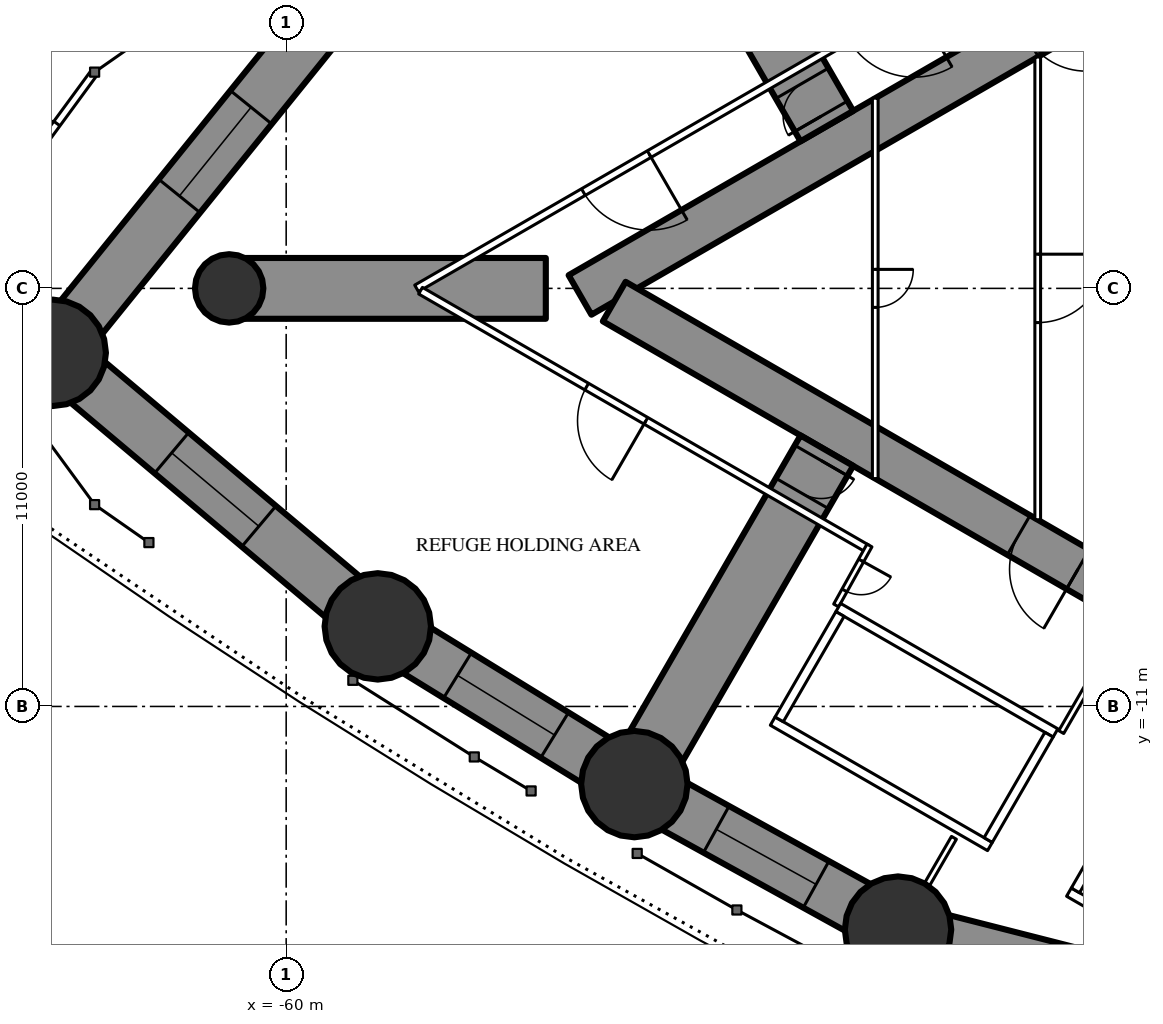
"""IFC4 building model, lengths in metres.
Left out: names, types, materials, properties, quantities, classifications, styles, units other than length and angle.
Written with IfcOpenShell. Run it as: python <this file> out.ifc"""

import sys

from ifc_helpers import new_model, si_unit, direction, frame, frame_2d, origin, origin_2d, place, context, subcontext, project, spatial, rectangle, circle, extrude, element, fill, save


model = new_model("IFC4")
c1 = context("Model", 3, precision=1e-05, world=origin(), true_north=direction((0.0, 1.0)))
c2 = subcontext(c1, "Body", "Model", "MODEL_VIEW")
j1 = project(units=[si_unit("LENGTHUNIT", "METRE"), si_unit("PLANEANGLEUNIT", "RADIAN")], contexts=[c1])
p1 = place(None, origin())
s1 = spatial("IfcSite", under=j1, at=p1, CompositionType="ELEMENT")
p2 = place(p1, origin())
s2 = spatial("IfcBuilding", under=s1, at=p2, CompositionType="ELEMENT")
p3 = place(p2, frame((0.0, 0.0, 152.7)))
s3 = spatial("IfcBuildingStorey", under=s2, at=p3, CompositionType="ELEMENT", Elevation=152.7)
for number, where, z_axis, x_axis in (
    (1, (-66.143, -1.695, 0.0), (0.0, 0.0, 1.0), (1.0, 0.0, 0.0)),
    (2, (-57.59, -8.893, 0.0), (0.0, 0.0, 1.0), (1.0, 0.0, 0.0)),
    (3, (-50.839, -13.043, 0.0), (0.0, 0.0, 1.0), (1.0, 0.0, 0.0)),
    (4, (-43.9, -16.871, 0.0), (0.0, 0.0, 1.0), (1.0, 0.0, 0.0)),
):
    element("IfcColumn", number, at=place(p3, frame(where, z_axis=z_axis, x_axis=x_axis)), inside=s3, PredefinedType="COLUMN", context=c2, shape_type="SweptSolid", body=[
        extrude(circle(Radius=1.4, at=origin_2d()), origin(), (0.0, 0.0, 1.0), 3.6),
    ])
p4 = place(p3, frame((-61.5, 0.0, 0.0), z_axis=(0.0, 0.0, 1.0), x_axis=(1.0, 0.0, 0.0)))
e5 = element("IfcColumn", 5, at=p4, inside=s3, PredefinedType="COLUMN", context=c2, shape_type="SweptSolid", body=[
    extrude(circle(Radius=0.9, at=origin_2d()), origin(), (0.0, 0.0, 1.0), 3.6),
])
p5 = place(p3, frame((-27.2, 14.3, 0.0), z_axis=(0.0, 0.0, 1.0), x_axis=(-0.866026593062, -0.499997940104, 0.0)))
e6 = element("IfcWall", 6, at=p5, inside=s3, PredefinedType="SHEAR", context=c2, shape_type="SweptSolid", body=[
    extrude(rectangle(XDim=28.946, YDim=1.2, at=frame_2d((14.473, 0.0))), origin(), (0.0, 0.0, 1.0), 3.6),
])
p6 = place(p5, frame((4.6, 0.0, 0.0)))
e7 = element("IfcOpeningElement", 7, at=p6, cuts=e6, PredefinedType="OPENING", context=c2, shape_type="SweptSolid", body=[
    extrude(rectangle(XDim=1.0, YDim=2.2, at=frame_2d((0.5, 1.1))), frame((0.0, 0.61, 0.0), z_axis=(0.0, -1.0, 0.0), x_axis=(1.0, 0.0, 0.0)), (0.0, 0.0, 1.0), 1.22),
])
p7 = place(p5, frame((13.568, 0.0, 0.0)))
e8 = element("IfcOpeningElement", 8, at=p7, cuts=e6, PredefinedType="OPENING", context=c2, shape_type="SweptSolid", body=[
    extrude(rectangle(XDim=1.8, YDim=2.04, at=frame_2d((0.9, 1.02))), frame((0.0, 0.61, 0.0), z_axis=(0.0, -1.0, 0.0), x_axis=(1.0, 0.0, 0.0)), (0.0, 0.0, 1.0), 1.22),
])
p8 = place(p3, frame((-27.2, -14.3, 0.0), z_axis=(0.0, 0.0, 1.0), x_axis=(-0.866024021859, 0.500002393557, 0.0)))
e9 = element("IfcWall", 9, at=p8, inside=s3, PredefinedType="SHEAR", context=c2, shape_type="SweptSolid", body=[
    extrude(rectangle(XDim=27.907, YDim=1.2, at=frame_2d((13.954, 0.0))), origin(), (0.0, 0.0, 1.0), 3.6),
])
p9 = place(p8, frame((4.6, 0.0, 0.0)))
e10 = element("IfcOpeningElement", 10, at=p9, cuts=e9, PredefinedType="OPENING", context=c2, shape_type="SweptSolid", body=[
    extrude(rectangle(XDim=1.0, YDim=2.2, at=frame_2d((0.5, 1.1))), frame((0.0, 0.61, 0.0), z_axis=(0.0, -1.0, 0.0), x_axis=(1.0, 0.0, 0.0)), (0.0, 0.0, 1.0), 1.22),
])
p10 = place(p8, frame((13.818, 0.0, 0.0)))
e11 = element("IfcOpeningElement", 11, at=p10, cuts=e9, PredefinedType="OPENING", context=c2, shape_type="SweptSolid", body=[
    extrude(rectangle(XDim=1.8, YDim=2.2, at=frame_2d((0.9, 1.1))), frame((0.0, 0.61, 0.0), z_axis=(0.0, -1.0, 0.0), x_axis=(1.0, 0.0, 0.0)), (0.0, 0.0, 1.0), 1.22),
])
p11 = place(p3, frame((-45.773, 4.27, 0.0), z_axis=(0.0, 0.0, 1.0), x_axis=(-0.499995723283, 0.866027872934, 0.0)))
e12 = element("IfcWall", 12, at=p11, inside=s3, PredefinedType="SHEAR", context=c2, shape_type="SweptSolid", body=[
    extrude(rectangle(XDim=10.131, YDim=1.6, at=frame_2d((5.065, 0.0))), origin(), (0.0, 0.0, 1.0), 3.6),
])
p12 = place(p11, frame((0.3, 0.0, 0.0)))
e13 = element("IfcOpeningElement", 13, at=p12, cuts=e12, PredefinedType="OPENING", context=c2, shape_type="SweptSolid", body=[
    extrude(rectangle(XDim=1.0, YDim=2.2, at=frame_2d((0.5, 1.1))), frame((0.0, 0.81, 0.0), z_axis=(0.0, -1.0, 0.0), x_axis=(1.0, 0.0, 0.0)), (0.0, 0.0, 1.0), 1.62),
])
p13 = place(p3, frame((-53.168, 0.0, 0.0), z_axis=(0.0, 0.0, 1.0), x_axis=(-1.0, 0.0, 0.0)))
e14 = element("IfcWall", 14, at=p13, inside=s3, PredefinedType="SHEAR", context=c2, shape_type="SweptSolid", body=[
    extrude(rectangle(XDim=8.332, YDim=1.6, at=frame_2d((4.166, 0.0))), origin(), (0.0, 0.0, 1.0), 3.6),
])
p14 = place(p3, frame((-45.773, -4.27, 0.0), z_axis=(0.0, 0.0, 1.0), x_axis=(-0.499995723283, -0.866027872934, 0.0)))
e15 = element("IfcWall", 15, at=p14, inside=s3, PredefinedType="SHEAR", context=c2, shape_type="SweptSolid", body=[
    extrude(rectangle(XDim=10.131, YDim=1.6, at=frame_2d((5.065, 0.0))), origin(), (0.0, 0.0, 1.0), 3.6),
])
p15 = place(p14, frame((0.3, 0.0, 0.0)))
e16 = element("IfcOpeningElement", 16, at=p15, cuts=e15, PredefinedType="OPENING", context=c2, shape_type="SweptSolid", body=[
    extrude(rectangle(XDim=1.0, YDim=2.2, at=frame_2d((0.5, 1.1))), frame((0.0, 0.81, 0.0), z_axis=(0.0, -1.0, 0.0), x_axis=(1.0, 0.0, 0.0)), (0.0, 0.0, 1.0), 1.62),
])
p16 = place(p3, frame((-57.59, 8.893, 0.0), z_axis=(0.0, 0.0, 1.0), x_axis=(-0.628373846765, -0.777911504416, 0.0)))
e17 = element("IfcWall", 17, at=p16, inside=s3, PredefinedType="SHEAR", context=c2, shape_type="SweptSolid", body=[
    extrude(rectangle(XDim=13.611, YDim=1.4, at=frame_2d((6.806, 0.0))), origin(), (0.0, 0.0, 1.0), 3.6),
])
p17 = place(p16, frame((5.306, 0.0, 0.6)))
e18 = element("IfcOpeningElement", 18, at=p17, cuts=e17, PredefinedType="OPENING", context=c2, shape_type="SweptSolid", body=[
    extrude(rectangle(XDim=3.0, YDim=1.2, at=frame_2d((1.5, 0.6))), frame((0.0, 0.71, 0.0), z_axis=(0.0, -1.0, 0.0), x_axis=(1.0, 0.0, 0.0)), (0.0, 0.0, 1.0), 1.42),
])
p18 = place(p3, frame((-66.143, -1.695, 0.0), z_axis=(0.0, 0.0, 1.0), x_axis=(0.765120708367, -0.64388687021, 0.0)))
e19 = element("IfcWall", 19, at=p18, inside=s3, PredefinedType="SHEAR", context=c2, shape_type="SweptSolid", body=[
    extrude(rectangle(XDim=11.179, YDim=1.4, at=frame_2d((5.589, 0.0))), origin(), (0.0, 0.0, 1.0), 3.6),
])
p19 = place(p18, frame((4.089, 0.0, 0.6)))
e20 = element("IfcOpeningElement", 20, at=p19, cuts=e19, PredefinedType="OPENING", context=c2, shape_type="SweptSolid", body=[
    extrude(rectangle(XDim=3.0, YDim=1.2, at=frame_2d((1.5, 0.6))), frame((0.0, 0.71, 0.0), z_axis=(0.0, -1.0, 0.0), x_axis=(1.0, 0.0, 0.0)), (0.0, 0.0, 1.0), 1.42),
])
p20 = place(p3, frame((-57.59, -8.893, 0.0), z_axis=(0.0, 0.0, 1.0), x_axis=(0.851892008043, -0.523717487423, 0.0)))
e21 = element("IfcWall", 21, at=p20, inside=s3, PredefinedType="SHEAR", context=c2, shape_type="SweptSolid", body=[
    extrude(rectangle(XDim=7.924, YDim=1.4, at=frame_2d((3.962, 0.0))), origin(), (0.0, 0.0, 1.0), 3.6),
])
p21 = place(p20, frame((2.462, 0.0, 0.6)))
e22 = element("IfcOpeningElement", 22, at=p21, cuts=e21, PredefinedType="OPENING", context=c2, shape_type="SweptSolid", body=[
    extrude(rectangle(XDim=3.0, YDim=1.2, at=frame_2d((1.5, 0.6))), frame((0.0, 0.71, 0.0), z_axis=(0.0, -1.0, 0.0), x_axis=(1.0, 0.0, 0.0)), (0.0, 0.0, 1.0), 1.42),
])
p22 = place(p3, frame((-50.839, -13.043, 0.0), z_axis=(0.0, 0.0, 1.0), x_axis=(0.875577684027, -0.483077342911, 0.0)))
e23 = element("IfcWall", 23, at=p22, inside=s3, PredefinedType="SHEAR", context=c2, shape_type="SweptSolid", body=[
    extrude(rectangle(XDim=7.925, YDim=1.4, at=frame_2d((3.962, 0.0))), origin(), (0.0, 0.0, 1.0), 3.6),
])
p23 = place(p22, frame((2.462, 0.0, 0.6)))
e24 = element("IfcOpeningElement", 24, at=p23, cuts=e23, PredefinedType="OPENING", context=c2, shape_type="SweptSolid", body=[
    extrude(rectangle(XDim=3.0, YDim=1.2, at=frame_2d((1.5, 0.6))), frame((0.0, 0.71, 0.0), z_axis=(0.0, -1.0, 0.0), x_axis=(1.0, 0.0, 0.0)), (0.0, 0.0, 1.0), 1.42),
])
p24 = place(p3, frame((-43.9, -16.871, 0.0), z_axis=(0.0, 0.0, 1.0), x_axis=(0.969008414312, -0.247027717052, 0.0)))
e25 = element("IfcWall", 25, at=p24, inside=s3, PredefinedType="SHEAR", context=c2, shape_type="SweptSolid", body=[
    extrude(rectangle(XDim=12.729, YDim=1.4, at=frame_2d((6.365, 0.0))), origin(), (0.0, 0.0, 1.0), 3.6),
])
p25 = place(p24, frame((4.865, 0.0, 0.6)))
e26 = element("IfcOpeningElement", 26, at=p25, cuts=e25, PredefinedType="OPENING", context=c2, shape_type="SweptSolid", body=[
    extrude(rectangle(XDim=3.0, YDim=1.2, at=frame_2d((1.5, 0.6))), frame((0.0, 0.71, 0.0), z_axis=(0.0, -1.0, 0.0), x_axis=(1.0, 0.0, 0.0)), (0.0, 0.0, 1.0), 1.42),
])
p26 = place(p3, frame((-67.616, 2.177, 0.0), z_axis=(0.0, 0.0, 1.0), x_axis=(0.591310200732, 0.806444199254, 0.0)))
e27 = element("IfcWall", 27, at=p26, inside=s3, PredefinedType="STANDARD", context=c2, shape_type="SweptSolid", body=[
    extrude(rectangle(XDim=4.355, YDim=0.2, at=frame_2d((2.178, 0.0))), origin(), (0.0, 0.0, 1.0), 3.35),
])
p27 = place(p26, frame((1.677, 0.0, 0.0)))
e28 = element("IfcOpeningElement", 28, at=p27, cuts=e27, PredefinedType="OPENING", context=c2, shape_type="SweptSolid", body=[
    extrude(rectangle(XDim=1.0, YDim=2.2, at=frame_2d((0.5, 1.1))), frame((0.0, 0.11, 0.0), z_axis=(0.0, -1.0, 0.0), x_axis=(1.0, 0.0, 0.0)), (0.0, 0.0, 1.0), 0.22),
])
p28 = place(p3, frame((-27.803, 16.608, 0.0), z_axis=(0.0, 0.0, 1.0), x_axis=(-0.866025851808, -0.499999223999, 0.0)))
e29 = element("IfcWall", 29, at=p28, inside=s3, PredefinedType="PARTITIONING", context=c2, shape_type="SweptSolid", body=[
    extrude(rectangle(XDim=33.215, YDim=0.2, at=frame_2d((16.608, 0.0))), origin(), (0.0, 0.0, 1.0), 3.35),
])
p29 = place(p28, frame((4.584, 0.0, 0.0)))
e30 = element("IfcOpeningElement", 30, at=p29, cuts=e29, PredefinedType="OPENING", context=c2, shape_type="SweptSolid", body=[
    extrude(rectangle(XDim=2.0, YDim=2.4, at=frame_2d((1.0, 1.2))), frame((0.0, 0.11, 0.0), z_axis=(0.0, -1.0, 0.0), x_axis=(1.0, 0.0, 0.0)), (0.0, 0.0, 1.0), 0.22),
])
p30 = place(p28, frame((18.1, 0.0, 0.0)))
e31 = element("IfcOpeningElement", 31, at=p30, cuts=e29, PredefinedType="OPENING", context=c2, shape_type="SweptSolid", body=[
    extrude(rectangle(XDim=2.0, YDim=2.4, at=frame_2d((1.0, 1.2))), frame((0.0, 0.11, 0.0), z_axis=(0.0, -1.0, 0.0), x_axis=(1.0, 0.0, 0.0)), (0.0, 0.0, 1.0), 0.22),
])
p31 = place(p28, frame((26.147, 0.0, 0.0)))
e32 = element("IfcOpeningElement", 32, at=p31, cuts=e29, PredefinedType="OPENING", context=c2, shape_type="SweptSolid", body=[
    extrude(rectangle(XDim=2.0, YDim=2.4, at=frame_2d((1.0, 1.2))), frame((0.0, 0.11, 0.0), z_axis=(0.0, -1.0, 0.0), x_axis=(1.0, 0.0, 0.0)), (0.0, 0.0, 1.0), 0.22),
])
p32 = place(p3, frame((-42.429, -14.457, 0.0), z_axis=(0.0, 0.0, 1.0), x_axis=(-0.5000578829, -0.865991982497, 0.0)))
e33 = element("IfcWall", 33, at=p32, inside=s3, PredefinedType="PARTITIONING", context=c2, shape_type="SweptSolid", body=[
    extrude(rectangle(XDim=1.407, YDim=0.15, at=frame_2d((0.704, 0.0))), origin(), (0.0, 0.0, 1.0), 3.35),
])
p33 = place(p3, frame((-44.715, -6.844, 0.0), z_axis=(0.0, 0.0, 1.0), x_axis=(-0.866025261224, 0.500000246922, 0.0)))
e34 = element("IfcWall", 34, at=p33, inside=s3, PredefinedType="PARTITIONING", context=c2, shape_type="SweptSolid", body=[
    extrude(rectangle(XDim=13.567, YDim=0.2, at=frame_2d((6.783, 0.0))), origin(), (0.0, 0.0, 1.0), 3.35),
])
p34 = place(p33, frame((6.719, 0.0, 0.0)))
e35 = element("IfcOpeningElement", 35, at=p34, cuts=e34, PredefinedType="OPENING", context=c2, shape_type="SweptSolid", body=[
    extrude(rectangle(XDim=1.8, YDim=2.2, at=frame_2d((0.9, 1.1))), frame((0.0, 0.11, 0.0), z_axis=(0.0, -1.0, 0.0), x_axis=(1.0, 0.0, 0.0)), (0.0, 0.0, 1.0), 0.22),
])
p35 = place(p3, frame((-44.652, -6.764, 0.0), z_axis=(0.0, 0.0, 1.0), x_axis=(-0.485528096672, -0.8742210632, 0.0)))
e36 = element("IfcWall", 36, at=p35, inside=s3, PredefinedType="PARTITIONING", context=c2, shape_type="SweptSolid", body=[
    extrude(rectangle(XDim=1.805, YDim=0.15, at=frame_2d((0.903, 0.0))), origin(), (0.0, 0.0, 1.0), 3.35),
])
p36 = place(p35, frame((0.453, 0.0, 0.0)))
e37 = element("IfcOpeningElement", 37, at=p36, cuts=e36, PredefinedType="OPENING", context=c2, shape_type="SweptSolid", body=[
    extrude(rectangle(XDim=0.9, YDim=2.04, at=frame_2d((0.45, 1.02))), frame((0.0, 0.085, 0.0), z_axis=(0.0, -1.0, 0.0), x_axis=(1.0, 0.0, 0.0)), (0.0, 0.0, 1.0), 0.17),
])
p37 = place(p3, frame((-38.841, -10.35, 0.0), z_axis=(0.0, 0.0, 1.0), x_axis=(-0.499966498333, -0.866044745117, 0.0)))
e38 = element("IfcWall", 38, at=p37, inside=s3, PredefinedType="PARTITIONING", context=c2, shape_type="SweptSolid", body=[
    extrude(rectangle(XDim=1.53, YDim=0.15, at=frame_2d((0.765, 0.0))), origin(), (0.0, 0.0, 1.0), 3.35),
])
p38 = place(p3, frame((-40.225, 6.087, 0.0), z_axis=(0.0, 0.0, 1.0), x_axis=(0.0, -1.0, 0.0)))
e39 = element("IfcWall", 39, at=p38, inside=s3, PredefinedType="PARTITIONING", context=c2, shape_type="SweptSolid", body=[
    extrude(rectangle(XDim=12.174, YDim=0.15, at=frame_2d((6.087, 0.0))), origin(), (0.0, 0.0, 1.0), 3.35),
])
p39 = place(p38, frame((5.187, 0.0, 0.0)))
e40 = element("IfcOpeningElement", 40, at=p39, cuts=e39, PredefinedType="OPENING", context=c2, shape_type="SweptSolid", body=[
    extrude(rectangle(XDim=1.8, YDim=2.2, at=frame_2d((0.9, 1.1))), frame((0.0, 0.085, 0.0), z_axis=(0.0, -1.0, 0.0), x_axis=(1.0, 0.0, 0.0)), (0.0, 0.0, 1.0), 0.17),
])
p40 = place(p3, frame((-44.5, 5.005, 0.0), z_axis=(0.0, 0.0, 1.0), x_axis=(0.0, -1.0, 0.0)))
e41 = element("IfcWall", 41, at=p40, inside=s3, PredefinedType="PARTITIONING", context=c2, shape_type="SweptSolid", body=[
    extrude(rectangle(XDim=10.009, YDim=0.15, at=frame_2d((5.005, 0.0))), origin(), (0.0, 0.0, 1.0), 3.35),
])
p41 = place(p40, frame((4.505, 0.0, 0.0)))
e42 = element("IfcOpeningElement", 42, at=p41, cuts=e41, PredefinedType="OPENING", context=c2, shape_type="SweptSolid", body=[
    extrude(rectangle(XDim=1.0, YDim=2.2, at=frame_2d((0.5, 1.1))), frame((0.0, 0.085, 0.0), z_axis=(0.0, -1.0, 0.0), x_axis=(1.0, 0.0, 0.0)), (0.0, 0.0, 1.0), 0.17),
])
p42 = place(p3, frame((-35.42, -18.186, 0.0), z_axis=(0.0, 0.0, 1.0), x_axis=(-0.865990227814, 0.50006092162, 0.0)))
e43 = element("IfcWall", 43, at=p42, inside=s3, PredefinedType="PARTITIONING", context=c2, shape_type="SweptSolid", body=[
    extrude(rectangle(XDim=4.6, YDim=0.25, at=frame_2d((2.3, 0.0))), origin(), (0.0, 0.0, 1.0), 3.35),
])
p43 = place(p3, frame((-37.633, -13.068, 0.0), z_axis=(0.0, 0.0, 1.0), x_axis=(-0.499872130319, -0.866099216793, 0.0)))
e44 = element("IfcWall", 44, at=p43, inside=s3, PredefinedType="PARTITIONING", context=c2, shape_type="SweptSolid", body=[
    extrude(rectangle(XDim=3.2, YDim=0.25, at=frame_2d((1.6, 0.0))), origin(), (0.0, 0.0, 1.0), 3.35),
])
p44 = place(p3, frame((-39.758, -11.697, 0.0), z_axis=(0.0, 0.0, 1.0), x_axis=(-0.866024194504, 0.500002094529, 0.0)))
e45 = element("IfcWall", 45, at=p44, inside=s3, PredefinedType="PARTITIONING", context=c2, shape_type="SweptSolid", body=[
    extrude(rectangle(XDim=6.6, YDim=0.25, at=frame_2d((3.3, 0.0))), origin(), (0.0, 0.0, 1.0), 3.35),
])
p45 = place(p3, frame((-41.482, -14.686, 0.0), z_axis=(0.0, 0.0, 1.0), x_axis=(-0.86603344179, 0.499986077507, 0.0)))
e46 = element("IfcWall", 46, at=p45, inside=s3, PredefinedType="PARTITIONING", context=c2, shape_type="SweptSolid", body=[
    extrude(rectangle(XDim=6.6, YDim=0.25, at=frame_2d((3.3, 0.0))), origin(), (0.0, 0.0, 1.0), 3.35),
])
for number, where, z_axis, x_axis in (
    (47, (-39.928, -11.743, 0.0), (0.0, 0.0, 1.0), (-0.5, -0.866, 0.0)),
    (48, (-45.428, -8.568, 0.0), (0.0, 0.0, 1.0), (-0.5, -0.866, 0.0)),
):
    element("IfcWall", number, at=place(p3, frame(where, z_axis=z_axis, x_axis=x_axis)), inside=s3, PredefinedType="PARTITIONING", context=c2, shape_type="SweptSolid", body=[
        extrude(rectangle(XDim=3.201, YDim=0.25, at=frame_2d((1.6, 0.0))), origin(), (0.0, 0.0, 1.0), 3.35),
    ])
p46 = place(p17, origin())
e49 = element("IfcWindow", 49, at=p46, inside=s3, PartitioningType="SINGLE_PANEL", PredefinedType="WINDOW", context=c2, shape_type="SweptSolid", body=[
    extrude(rectangle(XDim=3.0, YDim=1.2, at=frame_2d((1.5, 0.6))), frame((0.0, 0.03, 0.0), z_axis=(0.0, -1.0, 0.0), x_axis=(1.0, 0.0, 0.0)), (0.0, 0.0, 1.0), 0.06),
])
fill(e18, e49)
p47 = place(p19, origin())
e50 = element("IfcWindow", 50, at=p47, inside=s3, PartitioningType="SINGLE_PANEL", PredefinedType="WINDOW", context=c2, shape_type="SweptSolid", body=[
    extrude(rectangle(XDim=3.0, YDim=1.2, at=frame_2d((1.5, 0.6))), frame((0.0, 0.03, 0.0), z_axis=(0.0, -1.0, 0.0), x_axis=(1.0, 0.0, 0.0)), (0.0, 0.0, 1.0), 0.06),
])
fill(e20, e50)
p48 = place(p21, origin())
e51 = element("IfcWindow", 51, at=p48, inside=s3, PartitioningType="SINGLE_PANEL", PredefinedType="WINDOW", context=c2, shape_type="SweptSolid", body=[
    extrude(rectangle(XDim=3.0, YDim=1.2, at=frame_2d((1.5, 0.6))), frame((0.0, 0.03, 0.0), z_axis=(0.0, -1.0, 0.0), x_axis=(1.0, 0.0, 0.0)), (0.0, 0.0, 1.0), 0.06),
])
fill(e22, e51)
p49 = place(p23, origin())
e52 = element("IfcWindow", 52, at=p49, inside=s3, PartitioningType="SINGLE_PANEL", PredefinedType="WINDOW", context=c2, shape_type="SweptSolid", body=[
    extrude(rectangle(XDim=3.0, YDim=1.2, at=frame_2d((1.5, 0.6))), frame((0.0, 0.03, 0.0), z_axis=(0.0, -1.0, 0.0), x_axis=(1.0, 0.0, 0.0)), (0.0, 0.0, 1.0), 0.06),
])
fill(e24, e52)
p50 = place(p27, origin())
e53 = element("IfcDoor", 53, at=p50, inside=s3, OperationType="SINGLE_SWING_LEFT", PredefinedType="DOOR", context=c2, shape_type="SweptSolid", body=[
    extrude(rectangle(XDim=1.0, YDim=2.2, at=frame_2d((0.5, 1.1))), frame((0.0, 0.025, 0.0), z_axis=(0.0, -1.0, 0.0), x_axis=(1.0, 0.0, 0.0)), (0.0, 0.0, 1.0), 0.05),
])
fill(e28, e53)
p51 = place(p12, origin())
e54 = element("IfcDoor", 54, at=p51, inside=s3, OperationType="SINGLE_SWING_LEFT", PredefinedType="DOOR", context=c2, shape_type="SweptSolid", body=[
    extrude(rectangle(XDim=1.0, YDim=2.2, at=frame_2d((0.5, 1.1))), frame((0.0, 0.025, 0.0), z_axis=(0.0, -1.0, 0.0), x_axis=(1.0, 0.0, 0.0)), (0.0, 0.0, 1.0), 0.05),
])
fill(e13, e54)
p52 = place(p15, origin())
e55 = element("IfcDoor", 55, at=p52, inside=s3, OperationType="SINGLE_SWING_LEFT", PredefinedType="DOOR", context=c2, shape_type="SweptSolid", body=[
    extrude(rectangle(XDim=1.0, YDim=2.2, at=frame_2d((0.5, 1.1))), frame((0.0, 0.025, 0.0), z_axis=(0.0, -1.0, 0.0), x_axis=(1.0, 0.0, 0.0)), (0.0, 0.0, 1.0), 0.05),
])
fill(e16, e55)
p53 = place(p31, origin())
e56 = element("IfcDoor", 56, at=p53, inside=s3, OperationType="DOUBLE_DOOR_SINGLE_SWING", PredefinedType="DOOR", context=c2, shape_type="SweptSolid", body=[
    extrude(rectangle(XDim=2.0, YDim=2.4, at=frame_2d((1.0, 1.2))), frame((0.0, 0.025, 0.0), z_axis=(0.0, -1.0, 0.0), x_axis=(1.0, 0.0, 0.0)), (0.0, 0.0, 1.0), 0.05),
])
fill(e32, e56)
p54 = place(p34, origin())
e57 = element("IfcDoor", 57, at=p54, inside=s3, OperationType="DOUBLE_DOOR_SINGLE_SWING", PredefinedType="DOOR", context=c2, shape_type="SweptSolid", body=[
    extrude(rectangle(XDim=1.8, YDim=2.2, at=frame_2d((0.9, 1.1))), frame((0.0, 0.025, 0.0), z_axis=(0.0, -1.0, 0.0), x_axis=(1.0, 0.0, 0.0)), (0.0, 0.0, 1.0), 0.05),
])
fill(e35, e57)
p55 = place(p36, origin())
e58 = element("IfcDoor", 58, at=p55, inside=s3, OperationType="SINGLE_SWING_LEFT", PredefinedType="DOOR", context=c2, shape_type="SweptSolid", body=[
    extrude(rectangle(XDim=0.9, YDim=2.04, at=frame_2d((0.45, 1.02))), frame((0.0, 0.025, 0.0), z_axis=(0.0, -1.0, 0.0), x_axis=(1.0, 0.0, 0.0)), (0.0, 0.0, 1.0), 0.05),
])
fill(e37, e58)
p56 = place(p39, origin())
e59 = element("IfcDoor", 59, at=p56, inside=s3, OperationType="DOUBLE_DOOR_SINGLE_SWING", PredefinedType="DOOR", context=c2, shape_type="SweptSolid", body=[
    extrude(rectangle(XDim=1.8, YDim=2.2, at=frame_2d((0.9, 1.1))), frame((0.0, 0.025, 0.0), z_axis=(0.0, -1.0, 0.0), x_axis=(1.0, 0.0, 0.0)), (0.0, 0.0, 1.0), 0.05),
])
fill(e40, e59)
p57 = place(p41, origin())
e60 = element("IfcDoor", 60, at=p57, inside=s3, OperationType="SINGLE_SWING_LEFT", PredefinedType="DOOR", context=c2, shape_type="SweptSolid", body=[
    extrude(rectangle(XDim=1.0, YDim=2.2, at=frame_2d((0.5, 1.1))), frame((0.0, 0.025, 0.0), z_axis=(0.0, -1.0, 0.0), x_axis=(1.0, 0.0, 0.0)), (0.0, 0.0, 1.0), 0.05),
])
fill(e42, e60)
p58 = place(p10, origin())
e61 = element("IfcDoor", 61, at=p58, inside=s3, OperationType="DOUBLE_DOOR_SINGLE_SWING", PredefinedType="DOOR", context=c2, shape_type="SweptSolid", body=[
    extrude(rectangle(XDim=1.8, YDim=2.2, at=frame_2d((0.9, 1.1))), frame((0.0, 0.025, 0.0), z_axis=(0.0, -1.0, 0.0), x_axis=(1.0, 0.0, 0.0)), (0.0, 0.0, 1.0), 0.05),
])
fill(e11, e61)
save(model, sys.argv[1])
